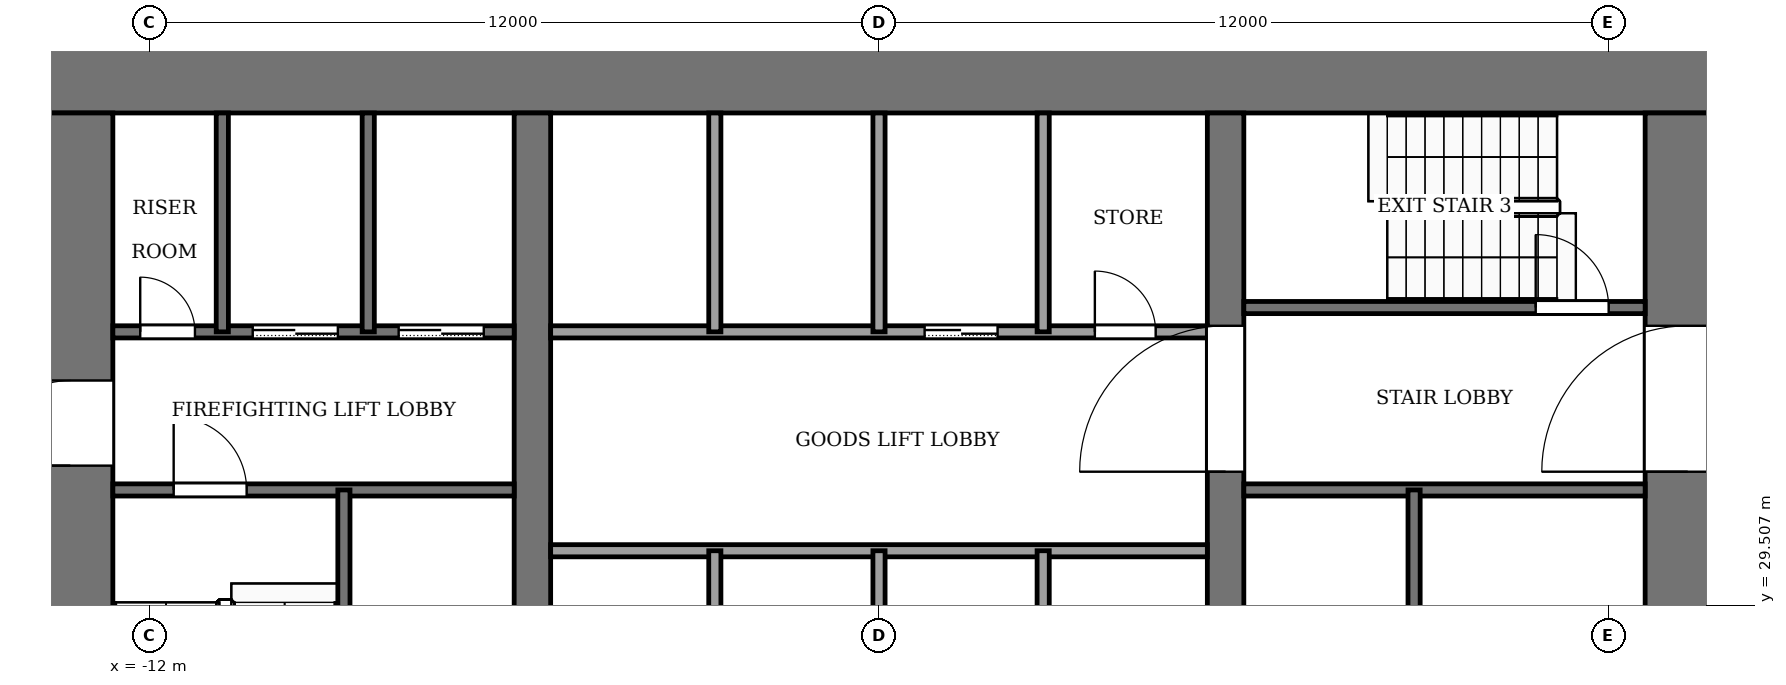
"""IFC4 building model, lengths in metres.
Left out: names, types, materials, properties, quantities, classifications, styles, units other than length and angle.
Written with IfcOpenShell. Run it as: python <this file> out.ifc"""

import sys

from ifc_helpers import new_model, si_unit, direction, frame, frame_2d, origin, place, context, subcontext, project, spatial, rectangle, extrude, element, fill, save


model = new_model("IFC4")
c1 = context("Model", 3, precision=1e-05, world=origin(), true_north=direction((0.0, 1.0)))
c2 = subcontext(c1, "Body", "Model", "MODEL_VIEW")
j1 = project(units=[si_unit("LENGTHUNIT", "METRE"), si_unit("PLANEANGLEUNIT", "RADIAN")], contexts=[c1])
p1 = place(None, origin())
s1 = spatial("IfcSite", under=j1, at=p1, CompositionType="ELEMENT")
p2 = place(p1, origin())
s2 = spatial("IfcBuilding", under=s1, at=p2, CompositionType="ELEMENT")
p3 = place(p2, frame((0.0, 0.0, 58.0)))
s3 = spatial("IfcBuildingStorey", under=s2, at=p3, CompositionType="ELEMENT", Elevation=58.0)
p4 = place(p3, frame((-14.0, 38.3, -0.25), z_axis=(0.0, 0.0, 1.0), x_axis=(1.0, 0.0, 0.0)))
e1 = element("IfcWall", 1, at=p4, inside=s3, PredefinedType="SHEAR", context=c2, shape_type="SweptSolid", body=[
    extrude(rectangle(XDim=28.0, YDim=1.4, at=frame_2d((14.0, 0.0))), origin(), (0.0, 0.0, 1.0), 7.12),
])
p5 = place(p3, frame((-13.3, 18.4, -0.25), z_axis=(0.0, 0.0, 1.0), x_axis=(0.0, 1.0, 0.0)))
e2 = element("IfcWall", 2, at=p5, inside=s3, PredefinedType="SHEAR", context=c2, shape_type="SweptSolid", body=[
    extrude(rectangle(XDim=19.2, YDim=1.4, at=frame_2d((9.6, 0.0))), origin(), (0.0, 0.0, 1.0), 7.12),
])
p6 = place(p5, frame((2.8, 0.0, 0.25)))
e3 = element("IfcOpeningElement", 3, at=p6, cuts=e2, PredefinedType="OPENING", context=c2, shape_type="SweptSolid", body=[
    extrude(rectangle(XDim=2.4, YDim=2.4, at=frame_2d((1.2, 1.2))), frame((0.0, 0.71, 0.0), z_axis=(0.0, -1.0, 0.0), x_axis=(1.0, 0.0, 0.0)), (0.0, 0.0, 1.0), 1.42),
])
p7 = place(p5, frame((13.4, 0.0, 0.25)))
e4 = element("IfcOpeningElement", 4, at=p7, cuts=e2, PredefinedType="OPENING", context=c2, shape_type="SweptSolid", body=[
    extrude(rectangle(XDim=1.4, YDim=2.2, at=frame_2d((0.7, 1.1))), frame((0.0, 0.71, 0.0), z_axis=(0.0, -1.0, 0.0), x_axis=(1.0, 0.0, 0.0)), (0.0, 0.0, 1.0), 1.42),
])
p8 = place(p3, frame((13.3, 18.4, -0.25), z_axis=(0.0, 0.0, 1.0), x_axis=(0.0, 1.0, 0.0)))
e5 = element("IfcWall", 5, at=p8, inside=s3, PredefinedType="SHEAR", context=c2, shape_type="SweptSolid", body=[
    extrude(rectangle(XDim=19.2, YDim=1.4, at=frame_2d((9.6, 0.0))), origin(), (0.0, 0.0, 1.0), 7.12),
])
p9 = place(p8, frame((2.8, 0.0, 0.25)))
e6 = element("IfcOpeningElement", 6, at=p9, cuts=e5, PredefinedType="OPENING", context=c2, shape_type="SweptSolid", body=[
    extrude(rectangle(XDim=2.4, YDim=2.4, at=frame_2d((1.2, 1.2))), frame((0.0, 0.71, 0.0), z_axis=(0.0, -1.0, 0.0), x_axis=(1.0, 0.0, 0.0)), (0.0, 0.0, 1.0), 1.42),
])
p10 = place(p8, frame((13.3, 0.0, 0.25)))
e7 = element("IfcOpeningElement", 7, at=p10, cuts=e5, PredefinedType="OPENING", context=c2, shape_type="SweptSolid", body=[
    extrude(rectangle(XDim=2.4, YDim=2.4, at=frame_2d((1.2, 1.2))), frame((0.0, 0.71, 0.0), z_axis=(0.0, -1.0, 0.0), x_axis=(1.0, 0.0, 0.0)), (0.0, 0.0, 1.0), 1.42),
])
p11 = place(p3, frame((-5.7, 18.4, -0.25), z_axis=(0.0, 0.0, 1.0), x_axis=(0.0, 1.0, 0.0)))
e8 = element("IfcWall", 8, at=p11, inside=s3, PredefinedType="SHEAR", context=c2, shape_type="SweptSolid", body=[
    extrude(rectangle(XDim=19.2, YDim=0.6, at=frame_2d((9.6, 0.0))), origin(), (0.0, 0.0, 1.0), 7.12),
])
p12 = place(p11, frame((8.35, 0.0, 0.25)))
e9 = element("IfcOpeningElement", 9, at=p12, cuts=e8, PredefinedType="OPENING", context=c2, shape_type="SweptSolid", body=[
    extrude(rectangle(XDim=0.9, YDim=2.1, at=frame_2d((0.45, 1.05))), frame((0.0, 0.31, 0.0), z_axis=(0.0, -1.0, 0.0), x_axis=(1.0, 0.0, 0.0)), (0.0, 0.0, 1.0), 0.62),
])
p13 = place(p3, frame((5.7, 18.4, -0.25), z_axis=(0.0, 0.0, 1.0), x_axis=(0.0, 1.0, 0.0)))
e10 = element("IfcWall", 10, at=p13, inside=s3, PredefinedType="SHEAR", context=c2, shape_type="SweptSolid", body=[
    extrude(rectangle(XDim=19.2, YDim=0.6, at=frame_2d((9.6, 0.0))), origin(), (0.0, 0.0, 1.0), 7.12),
])
p14 = place(p13, frame((13.3, 0.0, 0.25)))
e11 = element("IfcOpeningElement", 11, at=p14, cuts=e10, PredefinedType="OPENING", context=c2, shape_type="SweptSolid", body=[
    extrude(rectangle(XDim=2.4, YDim=2.4, at=frame_2d((1.2, 1.2))), frame((0.0, 0.31, 0.0), z_axis=(0.0, -1.0, 0.0), x_axis=(1.0, 0.0, 0.0)), (0.0, 0.0, 1.0), 0.62),
])
p15 = place(p3, frame((-5.4, 30.4, 0.0), z_axis=(0.0, 0.0, 1.0), x_axis=(1.0, 0.0, 0.0)))
e12 = element("IfcWall", 12, at=p15, inside=s3, PredefinedType="PARTITIONING", context=c2, shape_type="SweptSolid", body=[
    extrude(rectangle(XDim=10.8, YDim=0.2, at=frame_2d((5.4, 0.0))), origin(), (0.0, 0.0, 1.0), 6.87),
])
p16 = place(p3, frame((-12.6, 31.4, 0.0), z_axis=(0.0, 0.0, 1.0), x_axis=(1.0, 0.0, 0.0)))
e13 = element("IfcWall", 13, at=p16, inside=s3, PredefinedType="PARTITIONING", context=c2, shape_type="SweptSolid", body=[
    extrude(rectangle(XDim=6.6, YDim=0.2, at=frame_2d((3.3, 0.0))), origin(), (0.0, 0.0, 1.0), 6.87),
])
p17 = place(p16, frame((1.0, 0.0, 0.0)))
e14 = element("IfcOpeningElement", 14, at=p17, cuts=e13, PredefinedType="OPENING", context=c2, shape_type="SweptSolid", body=[
    extrude(rectangle(XDim=1.2, YDim=2.2, at=frame_2d((0.6, 1.1))), frame((0.0, 0.11, 0.0), z_axis=(0.0, -1.0, 0.0), x_axis=(1.0, 0.0, 0.0)), (0.0, 0.0, 1.0), 0.22),
])
p18 = place(p3, frame((6.0, 31.4, 0.0), z_axis=(0.0, 0.0, 1.0), x_axis=(1.0, 0.0, 0.0)))
e15 = element("IfcWall", 15, at=p18, inside=s3, PredefinedType="PARTITIONING", context=c2, shape_type="SweptSolid", body=[
    extrude(rectangle(XDim=6.6, YDim=0.2, at=frame_2d((3.3, 0.0))), origin(), (0.0, 0.0, 1.0), 6.87),
])
p19 = place(p3, frame((-12.6, 34.0, 0.0), z_axis=(0.0, 0.0, 1.0), x_axis=(1.0, 0.0, 0.0)))
e16 = element("IfcWall", 16, at=p19, inside=s3, PredefinedType="PARTITIONING", context=c2, shape_type="SweptSolid", body=[
    extrude(rectangle(XDim=6.6, YDim=0.2, at=frame_2d((3.3, 0.0))), origin(), (0.0, 0.0, 1.0), 6.87),
])
p20 = place(p19, frame((4.7, 0.0, 0.0)))
e17 = element("IfcOpeningElement", 17, at=p20, cuts=e16, PredefinedType="OPENING", context=c2, shape_type="SweptSolid", body=[
    extrude(rectangle(XDim=1.4, YDim=2.2, at=frame_2d((0.7, 1.1))), frame((0.0, 0.11, 0.0), z_axis=(0.0, -1.0, 0.0), x_axis=(1.0, 0.0, 0.0)), (0.0, 0.0, 1.0), 0.22),
])
p21 = place(p19, frame((2.3, 0.0, 0.0)))
e18 = element("IfcOpeningElement", 18, at=p21, cuts=e16, PredefinedType="OPENING", context=c2, shape_type="SweptSolid", body=[
    extrude(rectangle(XDim=1.4, YDim=2.2, at=frame_2d((0.7, 1.1))), frame((0.0, 0.11, 0.0), z_axis=(0.0, -1.0, 0.0), x_axis=(1.0, 0.0, 0.0)), (0.0, 0.0, 1.0), 0.22),
])
p22 = place(p19, frame((0.45, 0.0, 0.0)))
e19 = element("IfcOpeningElement", 19, at=p22, cuts=e16, PredefinedType="OPENING", context=c2, shape_type="SweptSolid", body=[
    extrude(rectangle(XDim=0.9, YDim=2.1, at=frame_2d((0.45, 1.05))), frame((0.0, 0.11, 0.0), z_axis=(0.0, -1.0, 0.0), x_axis=(1.0, 0.0, 0.0)), (0.0, 0.0, 1.0), 0.22),
])
p23 = place(p3, frame((-5.4, 34.0, 0.0), z_axis=(0.0, 0.0, 1.0), x_axis=(1.0, 0.0, 0.0)))
e20 = element("IfcWall", 20, at=p23, inside=s3, PredefinedType="PARTITIONING", context=c2, shape_type="SweptSolid", body=[
    extrude(rectangle(XDim=10.8, YDim=0.2, at=frame_2d((5.4, 0.0))), origin(), (0.0, 0.0, 1.0), 6.87),
])
p24 = place(p23, frame((6.15, 0.0, 0.0)))
e21 = element("IfcOpeningElement", 21, at=p24, cuts=e20, PredefinedType="OPENING", context=c2, shape_type="SweptSolid", body=[
    extrude(rectangle(XDim=1.2, YDim=2.2, at=frame_2d((0.6, 1.1))), frame((0.0, 0.11, 0.0), z_axis=(0.0, -1.0, 0.0), x_axis=(1.0, 0.0, 0.0)), (0.0, 0.0, 1.0), 0.22),
])
p25 = place(p23, frame((8.95, 0.0, 0.0)))
e22 = element("IfcOpeningElement", 22, at=p25, cuts=e20, PredefinedType="OPENING", context=c2, shape_type="SweptSolid", body=[
    extrude(rectangle(XDim=1.0, YDim=2.1, at=frame_2d((0.5, 1.05))), frame((0.0, 0.11, 0.0), z_axis=(0.0, -1.0, 0.0), x_axis=(1.0, 0.0, 0.0)), (0.0, 0.0, 1.0), 0.22),
])
p26 = place(p3, frame((6.0, 34.4, 0.0), z_axis=(0.0, 0.0, 1.0), x_axis=(1.0, 0.0, 0.0)))
e23 = element("IfcWall", 23, at=p26, inside=s3, PredefinedType="PARTITIONING", context=c2, shape_type="SweptSolid", body=[
    extrude(rectangle(XDim=6.6, YDim=0.2, at=frame_2d((3.3, 0.0))), origin(), (0.0, 0.0, 1.0), 6.87),
])
p27 = place(p26, frame((4.8, 0.0, 0.0)))
e24 = element("IfcOpeningElement", 24, at=p27, cuts=e23, PredefinedType="OPENING", context=c2, shape_type="SweptSolid", body=[
    extrude(rectangle(XDim=1.2, YDim=2.2, at=frame_2d((0.6, 1.1))), frame((0.0, 0.11, 0.0), z_axis=(0.0, -1.0, 0.0), x_axis=(1.0, 0.0, 0.0)), (0.0, 0.0, 1.0), 0.22),
])
p28 = place(p3, frame((-10.8, 34.0, 0.0), z_axis=(0.0, 0.0, 1.0), x_axis=(0.0, 1.0, 0.0)))
e25 = element("IfcWall", 25, at=p28, inside=s3, PredefinedType="PARTITIONING", context=c2, shape_type="SweptSolid", body=[
    extrude(rectangle(XDim=3.6, YDim=0.2, at=frame_2d((1.8, 0.0))), origin(), (0.0, 0.0, 1.0), 6.87),
])
p29 = place(p3, frame((-8.8, 24.0, 0.0), z_axis=(0.0, 0.0, 1.0), x_axis=(0.0, 1.0, 0.0)))
e26 = element("IfcWall", 26, at=p29, inside=s3, PredefinedType="PARTITIONING", context=c2, shape_type="SweptSolid", body=[
    extrude(rectangle(XDim=7.4, YDim=0.2, at=frame_2d((3.7, 0.0))), origin(), (0.0, 0.0, 1.0), 6.87),
])
p30 = place(p3, frame((-8.4, 34.0, 0.0), z_axis=(0.0, 0.0, 1.0), x_axis=(0.0, 1.0, 0.0)))
e27 = element("IfcWall", 27, at=p30, inside=s3, PredefinedType="PARTITIONING", context=c2, shape_type="SweptSolid", body=[
    extrude(rectangle(XDim=3.6, YDim=0.2, at=frame_2d((1.8, 0.0))), origin(), (0.0, 0.0, 1.0), 6.87),
])
p31 = place(p3, frame((-2.7, 28.0, 0.0), z_axis=(0.0, 0.0, 1.0), x_axis=(0.0, 1.0, 0.0)))
e28 = element("IfcWall", 28, at=p31, inside=s3, PredefinedType="PARTITIONING", context=c2, shape_type="SweptSolid", body=[
    extrude(rectangle(XDim=2.4, YDim=0.2, at=frame_2d((1.2, 0.0))), origin(), (0.0, 0.0, 1.0), 6.87),
])
p32 = place(p3, frame((-2.7, 34.0, 0.0), z_axis=(0.0, 0.0, 1.0), x_axis=(0.0, 1.0, 0.0)))
e29 = element("IfcWall", 29, at=p32, inside=s3, PredefinedType="PARTITIONING", context=c2, shape_type="SweptSolid", body=[
    extrude(rectangle(XDim=3.6, YDim=0.2, at=frame_2d((1.8, 0.0))), origin(), (0.0, 0.0, 1.0), 6.87),
])
p33 = place(p3, frame((0.0, 28.0, 0.0), z_axis=(0.0, 0.0, 1.0), x_axis=(0.0, 1.0, 0.0)))
e30 = element("IfcWall", 30, at=p33, inside=s3, PredefinedType="PARTITIONING", context=c2, shape_type="SweptSolid", body=[
    extrude(rectangle(XDim=2.4, YDim=0.2, at=frame_2d((1.2, 0.0))), origin(), (0.0, 0.0, 1.0), 6.87),
])
p34 = place(p3, frame((0.0, 34.0, 0.0), z_axis=(0.0, 0.0, 1.0), x_axis=(0.0, 1.0, 0.0)))
e31 = element("IfcWall", 31, at=p34, inside=s3, PredefinedType="PARTITIONING", context=c2, shape_type="SweptSolid", body=[
    extrude(rectangle(XDim=3.6, YDim=0.2, at=frame_2d((1.8, 0.0))), origin(), (0.0, 0.0, 1.0), 6.87),
])
p35 = place(p3, frame((2.7, 28.0, 0.0), z_axis=(0.0, 0.0, 1.0), x_axis=(0.0, 1.0, 0.0)))
e32 = element("IfcWall", 32, at=p35, inside=s3, PredefinedType="PARTITIONING", context=c2, shape_type="SweptSolid", body=[
    extrude(rectangle(XDim=2.4, YDim=0.2, at=frame_2d((1.2, 0.0))), origin(), (0.0, 0.0, 1.0), 6.87),
])
p36 = place(p3, frame((2.7, 34.0, 0.0), z_axis=(0.0, 0.0, 1.0), x_axis=(0.0, 1.0, 0.0)))
e33 = element("IfcWall", 33, at=p36, inside=s3, PredefinedType="PARTITIONING", context=c2, shape_type="SweptSolid", body=[
    extrude(rectangle(XDim=3.6, YDim=0.2, at=frame_2d((1.8, 0.0))), origin(), (0.0, 0.0, 1.0), 6.87),
])
p37 = place(p3, frame((8.8, 24.0, 0.0), z_axis=(0.0, 0.0, 1.0), x_axis=(0.0, 1.0, 0.0)))
e34 = element("IfcWall", 34, at=p37, inside=s3, PredefinedType="PARTITIONING", context=c2, shape_type="SweptSolid", body=[
    extrude(rectangle(XDim=7.4, YDim=0.2, at=frame_2d((3.7, 0.0))), origin(), (0.0, 0.0, 1.0), 6.87),
])
p38 = place(p24, origin())
e35 = element("IfcDoor", 35, at=p38, inside=s3, OperationType="SLIDING_TO_LEFT", PredefinedType="DOOR", context=c2, shape_type="SweptSolid", body=[
    extrude(rectangle(XDim=1.2, YDim=2.2, at=frame_2d((0.6, 1.1))), frame((0.0, 0.025, 0.0), z_axis=(0.0, -1.0, 0.0), x_axis=(1.0, 0.0, 0.0)), (0.0, 0.0, 1.0), 0.05),
])
fill(e21, e35)
p39 = place(p20, origin())
e36 = element("IfcDoor", 36, at=p39, inside=s3, OperationType="SLIDING_TO_LEFT", PredefinedType="DOOR", context=c2, shape_type="SweptSolid", body=[
    extrude(rectangle(XDim=1.4, YDim=2.2, at=frame_2d((0.7, 1.1))), frame((0.0, 0.025, 0.0), z_axis=(0.0, -1.0, 0.0), x_axis=(1.0, 0.0, 0.0)), (0.0, 0.0, 1.0), 0.05),
])
fill(e17, e36)
p40 = place(p21, origin())
e37 = element("IfcDoor", 37, at=p40, inside=s3, OperationType="SLIDING_TO_LEFT", PredefinedType="DOOR", context=c2, shape_type="SweptSolid", body=[
    extrude(rectangle(XDim=1.4, YDim=2.2, at=frame_2d((0.7, 1.1))), frame((0.0, 0.025, 0.0), z_axis=(0.0, -1.0, 0.0), x_axis=(1.0, 0.0, 0.0)), (0.0, 0.0, 1.0), 0.05),
])
fill(e18, e37)
p41 = place(p22, origin())
e38 = element("IfcDoor", 38, at=p41, inside=s3, OperationType="SINGLE_SWING_RIGHT", PredefinedType="DOOR", context=c2, shape_type="SweptSolid", body=[
    extrude(rectangle(XDim=0.9, YDim=2.1, at=frame_2d((0.45, 1.05))), frame((0.0, 0.025, 0.0), z_axis=(0.0, -1.0, 0.0), x_axis=(1.0, 0.0, 0.0)), (0.0, 0.0, 1.0), 0.05),
])
fill(e19, e38)
p42 = place(p25, origin())
e39 = element("IfcDoor", 39, at=p42, inside=s3, OperationType="SINGLE_SWING_LEFT", PredefinedType="DOOR", context=c2, shape_type="SweptSolid", body=[
    extrude(rectangle(XDim=1.0, YDim=2.1, at=frame_2d((0.5, 1.05))), frame((0.0, 0.025, 0.0), z_axis=(0.0, -1.0, 0.0), x_axis=(1.0, 0.0, 0.0)), (0.0, 0.0, 1.0), 0.05),
])
fill(e22, e39)
p43 = place(p17, origin())
e40 = element("IfcDoor", 40, at=p43, inside=s3, OperationType="SINGLE_SWING_RIGHT", PredefinedType="DOOR", context=c2, shape_type="SweptSolid", body=[
    extrude(rectangle(XDim=1.2, YDim=2.2, at=frame_2d((0.6, 1.1))), frame((0.0, 0.025, 0.0), z_axis=(0.0, -1.0, 0.0), x_axis=(1.0, 0.0, 0.0)), (0.0, 0.0, 1.0), 0.05),
])
fill(e14, e40)
p44 = place(p27, origin())
e41 = element("IfcDoor", 41, at=p44, inside=s3, OperationType="SINGLE_SWING_RIGHT", PredefinedType="DOOR", context=c2, shape_type="SweptSolid", body=[
    extrude(rectangle(XDim=1.2, YDim=2.2, at=frame_2d((0.6, 1.1))), frame((0.0, 0.025, 0.0), z_axis=(0.0, -1.0, 0.0), x_axis=(1.0, 0.0, 0.0)), (0.0, 0.0, 1.0), 0.05),
])
fill(e24, e41)
p45 = place(p14, origin())
e42 = element("IfcDoor", 42, at=p45, inside=s3, OperationType="DOUBLE_DOOR_SINGLE_SWING", PredefinedType="DOOR", context=c2, shape_type="SweptSolid", body=[
    extrude(rectangle(XDim=2.4, YDim=2.4, at=frame_2d((1.2, 1.2))), frame((0.0, 0.025, 0.0), z_axis=(0.0, -1.0, 0.0), x_axis=(1.0, 0.0, 0.0)), (0.0, 0.0, 1.0), 0.05),
])
fill(e11, e42)
p46 = place(p10, origin())
e43 = element("IfcDoor", 43, at=p46, inside=s3, OperationType="DOUBLE_DOOR_SINGLE_SWING", PredefinedType="DOOR", context=c2, shape_type="SweptSolid", body=[
    extrude(rectangle(XDim=2.4, YDim=2.4, at=frame_2d((1.2, 1.2))), frame((0.0, 0.025, 0.0), z_axis=(0.0, -1.0, 0.0), x_axis=(1.0, 0.0, 0.0)), (0.0, 0.0, 1.0), 0.05),
])
fill(e7, e43)
p47 = place(p7, origin())
e44 = element("IfcDoor", 44, at=p47, inside=s3, OperationType="SINGLE_SWING_RIGHT", PredefinedType="DOOR", context=c2, shape_type="SweptSolid", body=[
    extrude(rectangle(XDim=1.4, YDim=2.2, at=frame_2d((0.7, 1.1))), frame((0.0, 0.025, 0.0), z_axis=(0.0, -1.0, 0.0), x_axis=(1.0, 0.0, 0.0)), (0.0, 0.0, 1.0), 0.05),
])
fill(e4, e44)
save(model, sys.argv[1])
